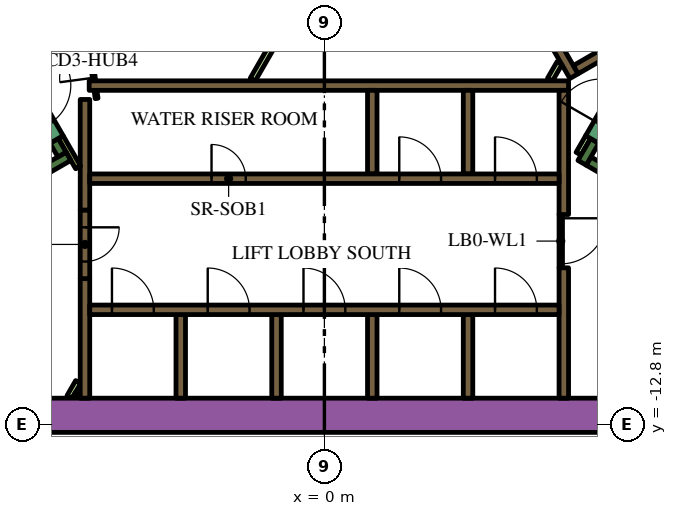
"""IFC4 building model, lengths in metres.
Left out: names, types, materials, properties, quantities, classifications, styles, units other than length and angle.
Written with IfcOpenShell. Run it as: python <this file> out.ifc"""

import sys

from ifc_helpers import new_model, si_unit, direction, frame, frame_2d, origin, place, context, subcontext, project, spatial, polyline, rectangle, outline, extrude, element, fill, save


model = new_model("IFC4")
c1 = context("Model", 3, precision=1e-05, world=origin(), true_north=direction((0.0, 1.0)))
c2 = subcontext(c1, "Body", "Model", "MODEL_VIEW")
j1 = project(units=[si_unit("LENGTHUNIT", "METRE"), si_unit("PLANEANGLEUNIT", "RADIAN")], contexts=[c1])
p1 = place(None, origin())
s1 = spatial("IfcSite", under=j1, at=p1, CompositionType="ELEMENT")
p2 = place(p1, origin())
s2 = spatial("IfcBuilding", under=s1, at=p2, CompositionType="ELEMENT")
p3 = place(p2, frame((0.0, 0.0, 62.7)))
s3 = spatial("IfcBuildingStorey", under=s2, at=p3, CompositionType="ELEMENT", Elevation=62.7)
p4 = place(p3, frame((6.776, 13.364, 0.0), z_axis=(0.0, 0.0, 1.0), x_axis=(0.500004177138, -0.8660229921, 0.0)))
e1 = element("IfcWall", 1, at=p4, inside=s3, PredefinedType="SOLIDWALL", context=c2, shape_type="SweptSolid", body=[
    extrude(rectangle(XDim=20.204, YDim=0.9, at=frame_2d((10.102, 0.0))), origin(), (0.0, 0.0, 1.0), 3.9),
])
p5 = place(p3, frame((-12.019, -12.55, 0.0), z_axis=(0.0, 0.0, 1.0), x_axis=(1.0, 0.0, 0.0)))
e2 = element("IfcWall", 2, at=p5, inside=s3, PredefinedType="SOLIDWALL", context=c2, shape_type="SweptSolid", body=[
    extrude(rectangle(XDim=21.63, YDim=0.9, at=frame_2d((10.815, 0.0))), origin(), (0.0, 0.0, 1.0), 3.9),
])
p6 = place(p3, frame((12.84, -9.261, 0.0), z_axis=(0.0, 0.0, 1.0), x_axis=(-0.866013990052, 0.500019768644, 0.0)))
e3 = element("IfcWall", 3, at=p6, inside=s3, PredefinedType="SOLIDWALL", context=c2, shape_type="SweptSolid", body=[
    extrude(rectangle(XDim=6.8, YDim=0.25, at=frame_2d((3.4, 0.0))), origin(), (0.0, 0.0, 1.0), 3.9),
])
p7 = place(p3, frame((7.113, -5.33, 0.0), z_axis=(0.0, 0.0, 1.0), x_axis=(-0.499965889992, -0.866045096311, 0.0)))
e4 = element("IfcWall", 4, at=p7, inside=s3, PredefinedType="SOLIDWALL", context=c2, shape_type="SweptSolid", body=[
    extrude(rectangle(XDim=0.666, YDim=0.25, at=frame_2d((0.333, 0.0))), origin(), (0.0, 0.0, 1.0), 3.9),
])
p8 = place(p3, frame((-12.84, -9.261, 0.0), z_axis=(0.0, 0.0, 1.0), x_axis=(0.866016039709, 0.500016218704, 0.0)))
e5 = element("IfcWall", 5, at=p8, inside=s3, PredefinedType="SOLIDWALL", context=c2, shape_type="SweptSolid", body=[
    extrude(rectangle(XDim=7.05, YDim=0.25, at=frame_2d((3.525, 0.0))), origin(), (0.0, 0.0, 1.0), 3.9),
])
p9 = place(p3, frame((-6.905, -5.69, 0.0), z_axis=(0.0, 0.0, 1.0), x_axis=(-0.499993700073, 0.866029041019, 0.0)))
e6 = element("IfcWall", 6, at=p9, inside=s3, PredefinedType="SOLIDWALL", context=c2, shape_type="SweptSolid", body=[
    extrude(rectangle(XDim=0.416, YDim=0.25, at=frame_2d((0.208, 0.0))), origin(), (0.0, 0.0, 1.0), 3.9),
])
p10 = place(p3, frame((-3.78, -12.1, 0.0), z_axis=(0.0, 0.0, 1.0), x_axis=(0.0, 1.0, 0.0)))
e7 = element("IfcWall", 7, at=p10, inside=s3, PredefinedType="SOLIDWALL", context=c2, shape_type="SweptSolid", body=[
    extrude(rectangle(XDim=2.2, YDim=0.25, at=frame_2d((1.1, 0.0))), origin(), (0.0, 0.0, 1.0), 3.9),
])
p11 = place(p3, frame((-6.3, -12.1, 0.0), z_axis=(0.0, 0.0, 1.0), x_axis=(0.0, 1.0, 0.0)))
e8 = element("IfcWall", 8, at=p11, inside=s3, PredefinedType="SOLIDWALL", context=c2, shape_type="SweptSolid", body=[
    extrude(rectangle(XDim=3.146, YDim=0.25, at=frame_2d((1.573, 0.0))), origin(), (0.0, 0.0, 1.0), 3.9),
])
p12 = place(p3, frame((-6.3, -4.24, 0.0), z_axis=(0.0, 0.0, 1.0), x_axis=(0.0, -1.0, 0.0)))
e9 = element("IfcWall", 9, at=p12, inside=s3, PredefinedType="SOLIDWALL", context=c2, shape_type="SweptSolid", body=[
    extrude(rectangle(XDim=2.914, YDim=0.25, at=frame_2d((1.457, 0.0))), origin(), (0.0, 0.0, 1.0), 3.9),
])
p13 = place(p3, frame((-6.19, -3.875, 0.0), z_axis=(0.0, 0.0, 1.0), x_axis=(1.0, 0.0, 0.0)))
e10 = element("IfcWall", 10, at=p13, inside=s3, PredefinedType="SOLIDWALL", context=c2, shape_type="SweptSolid", body=[
    extrude(rectangle(XDim=12.615, YDim=0.25, at=frame_2d((6.307, 0.0))), origin(), (0.0, 0.0, 1.0), 3.9),
])
p14 = place(p3, frame((6.3, -8.67, 0.0), z_axis=(0.0, 0.0, 1.0), x_axis=(0.0, -1.0, 0.0)))
e11 = element("IfcWall", 11, at=p14, inside=s3, PredefinedType="SOLIDWALL", context=c2, shape_type="SweptSolid", body=[
    extrude(rectangle(XDim=3.43, YDim=0.25, at=frame_2d((1.715, 0.0))), origin(), (0.0, 0.0, 1.0), 3.9),
])
p15 = place(p3, frame((6.3, -7.268, 0.0), z_axis=(0.0, 0.0, 1.0), x_axis=(0.0, 1.0, 0.0)))
e12 = element("IfcWall", 12, at=p15, inside=s3, PredefinedType="SOLIDWALL", context=c2, shape_type="SweptSolid", body=[
    extrude(rectangle(XDim=3.268, YDim=0.25, at=frame_2d((1.634, 0.0))), origin(), (0.0, 0.0, 1.0), 3.9),
])
for number, where, z_axis, x_axis in (
    (13, (3.78, -4.0, 0.0), (0.0, 0.0, 1.0), (0.0, -1.0, 0.0)),
    (14, (1.26, -4.0, 0.0), (0.0, 0.0, 1.0), (0.0, -1.0, 0.0)),
    (15, (3.78, -12.1, 0.0), (0.0, 0.0, 1.0), (0.0, 1.0, 0.0)),
    (16, (1.26, -12.1, 0.0), (0.0, 0.0, 1.0), (0.0, 1.0, 0.0)),
    (17, (-1.26, -12.1, 0.0), (0.0, 0.0, 1.0), (0.0, 1.0, 0.0)),
):
    element("IfcWall", number, at=place(p3, frame(where, z_axis=z_axis, x_axis=x_axis)), inside=s3, PredefinedType="SOLIDWALL", context=c2, shape_type="SweptSolid", body=[
        extrude(rectangle(XDim=2.2, YDim=0.25, at=frame_2d((1.1, 0.0))), origin(), (0.0, 0.0, 1.0), 3.9),
    ])
p16 = place(p3, origin())
e18 = element("IfcWall", 18, at=p16, inside=s3, PredefinedType="SOLIDWALL", context=c2, shape_type="SweptSolid", body=[
    extrude(outline(polyline([(0.335, 6.925), (0.335, 6.925), (0.335, 7.075), (0.335, 7.075), (0.335, 7.075), (0.245, 7.075), (0.079, 7.363), (0.035, 7.439), (0.252, 7.564), (0.377, 7.348), (6.552, -3.348), (6.677, -3.564), (6.46, -3.689), (4.897, -0.981), (0.332, 6.925), (0.335, 6.925), (0.335, 6.925)])), origin(), (0.0, 0.0, 1.0), 3.9),
])
p17 = place(p3, frame((9.352, -1.875, 0.0), z_axis=(0.0, 0.0, 1.0), x_axis=(-0.866024844342, -0.500000968981, 0.0)))
e19 = element("IfcWall", 19, at=p17, inside=s3, PredefinedType="SOLIDWALL", context=c2, shape_type="SweptSolid", body=[
    extrude(rectangle(XDim=3.162, YDim=0.25, at=frame_2d((1.581, 0.0))), origin(), (0.0, 0.0, 1.0), 3.9),
])
p18 = place(p3, frame((-6.708, -12.068, 0.0), z_axis=(0.0, 0.0, 1.0), x_axis=(0.500000789788, 0.8660249478, 0.0)))
e20 = element("IfcWall", 20, at=p18, inside=s3, PredefinedType="PARTITIONING", context=c2, shape_type="SweptSolid", body=[
    extrude(rectangle(XDim=0.456, YDim=0.15, at=frame_2d((0.228, 0.0))), origin(), (0.0, 0.0, 1.0), 2.75),
])
p19 = place(p3, frame((-6.534, -12.068, 0.0), z_axis=(0.0, 0.0, 1.0), x_axis=(0.500240224089, 0.865886665912, 0.0)))
e21 = element("IfcWall", 21, at=p19, inside=s3, PredefinedType="PARTITIONING", context=c2, shape_type="SweptSolid", body=[
    extrude(rectangle(XDim=0.109, YDim=0.15, at=frame_2d((0.054, 0.0))), origin(), (0.0, 0.0, 1.0), 2.75),
])
p20 = place(p3, frame((-6.48, -6.027, 0.0), z_axis=(0.0, 0.0, 1.0), x_axis=(-0.499936960004, 0.866061796884, 0.0)))
e22 = element("IfcWall", 22, at=p20, inside=s3, PredefinedType="PARTITIONING", context=c2, shape_type="SweptSolid", body=[
    extrude(rectangle(XDim=0.919, YDim=0.15, at=frame_2d((0.46, 0.0))), origin(), (0.0, 0.0, 1.0), 3.9),
])
p21 = place(p3, frame((-1.887, -3.718, 0.0), z_axis=(0.0, 0.0, 1.0), x_axis=(0.499842898591, 0.866116087328, 0.0)))
e23 = element("IfcWall", 23, at=p21, inside=s3, PredefinedType="PARTITIONING", context=c2, shape_type="SweptSolid", body=[
    extrude(rectangle(XDim=0.936, YDim=0.15, at=frame_2d((0.468, 0.0))), origin(), (0.0, 0.0, 1.0), 2.75),
])
p22 = place(p3, frame((6.688, -5.667, 0.0), z_axis=(0.0, 0.0, 1.0), x_axis=(0.499834152157, 0.86612113491, 0.0)))
e24 = element("IfcWall", 24, at=p22, inside=s3, PredefinedType="PARTITIONING", context=c2, shape_type="SweptSolid", body=[
    extrude(rectangle(XDim=0.505, YDim=0.15, at=frame_2d((0.252, 0.0))), origin(), (0.0, 0.0, 1.0), 2.75),
])
p23 = place(p3, frame((5.936, -3.718, 0.0), z_axis=(0.0, 0.0, 1.0), x_axis=(0.499890179513, 0.866088799389, 0.0)))
e25 = element("IfcWall", 25, at=p23, inside=s3, PredefinedType="PARTITIONING", context=c2, shape_type="SweptSolid", body=[
    extrude(rectangle(XDim=0.504, YDim=0.15, at=frame_2d((0.252, 0.0))), origin(), (0.0, 0.0, 1.0), 2.75),
])
p24 = place(p3, frame((-6.175, -9.775, 0.0), z_axis=(0.0, 0.0, 1.0), x_axis=(1.0, 0.0, 0.0)))
e26 = element("IfcWall", 26, at=p24, inside=s3, PredefinedType="SOLIDWALL", context=c2, shape_type="SweptSolid", body=[
    extrude(rectangle(XDim=12.35, YDim=0.25, at=frame_2d((6.175, 0.0))), origin(), (0.0, 0.0, 1.0), 3.9),
])
p25 = place(p24, frame((0.585, 0.0, 0.0)))
e27 = element("IfcOpeningElement", 27, at=p25, cuts=e26, PredefinedType="OPENING", context=c2, shape_type="SweptSolid", body=[
    extrude(rectangle(XDim=1.1, YDim=2.1, at=frame_2d((0.55, 1.05))), frame((0.0, 0.135, 0.0), z_axis=(0.0, -1.0, 0.0), x_axis=(1.0, 0.0, 0.0)), (0.0, 0.0, 1.0), 0.27),
])
p26 = place(p24, frame((3.105, 0.0, 0.0)))
e28 = element("IfcOpeningElement", 28, at=p26, cuts=e26, PredefinedType="OPENING", context=c2, shape_type="SweptSolid", body=[
    extrude(rectangle(XDim=1.1, YDim=2.1, at=frame_2d((0.55, 1.05))), frame((0.0, 0.135, 0.0), z_axis=(0.0, -1.0, 0.0), x_axis=(1.0, 0.0, 0.0)), (0.0, 0.0, 1.0), 0.27),
])
p27 = place(p24, frame((5.625, 0.0, 0.0)))
e29 = element("IfcOpeningElement", 29, at=p27, cuts=e26, PredefinedType="OPENING", context=c2, shape_type="SweptSolid", body=[
    extrude(rectangle(XDim=1.1, YDim=2.1, at=frame_2d((0.55, 1.05))), frame((0.0, 0.135, 0.0), z_axis=(0.0, -1.0, 0.0), x_axis=(1.0, 0.0, 0.0)), (0.0, 0.0, 1.0), 0.27),
])
p28 = place(p24, frame((8.145, 0.0, 0.0)))
e30 = element("IfcOpeningElement", 30, at=p28, cuts=e26, PredefinedType="OPENING", context=c2, shape_type="SweptSolid", body=[
    extrude(rectangle(XDim=1.1, YDim=2.1, at=frame_2d((0.55, 1.05))), frame((0.0, 0.135, 0.0), z_axis=(0.0, -1.0, 0.0), x_axis=(1.0, 0.0, 0.0)), (0.0, 0.0, 1.0), 0.27),
])
p29 = place(p24, frame((10.665, 0.0, 0.0)))
e31 = element("IfcOpeningElement", 31, at=p29, cuts=e26, PredefinedType="OPENING", context=c2, shape_type="SweptSolid", body=[
    extrude(rectangle(XDim=1.1, YDim=2.1, at=frame_2d((0.55, 1.05))), frame((0.0, 0.135, 0.0), z_axis=(0.0, -1.0, 0.0), x_axis=(1.0, 0.0, 0.0)), (0.0, 0.0, 1.0), 0.27),
])
p30 = place(p3, frame((-6.175, -6.325, 0.0), z_axis=(0.0, 0.0, 1.0), x_axis=(1.0, 0.0, 0.0)))
e32 = element("IfcWall", 32, at=p30, inside=s3, PredefinedType="SOLIDWALL", context=c2, shape_type="SweptSolid", body=[
    extrude(rectangle(XDim=12.35, YDim=0.25, at=frame_2d((6.175, 0.0))), origin(), (0.0, 0.0, 1.0), 3.9),
])
p31 = place(p30, frame((3.205, 0.0, 0.0)))
e33 = element("IfcOpeningElement", 33, at=p31, cuts=e32, PredefinedType="OPENING", context=c2, shape_type="SweptSolid", body=[
    extrude(rectangle(XDim=0.9, YDim=2.1, at=frame_2d((0.45, 1.05))), frame((0.0, 0.135, 0.0), z_axis=(0.0, -1.0, 0.0), x_axis=(1.0, 0.0, 0.0)), (0.0, 0.0, 1.0), 0.27),
])
p32 = place(p30, frame((8.145, 0.0, 0.0)))
e34 = element("IfcOpeningElement", 34, at=p32, cuts=e32, PredefinedType="OPENING", context=c2, shape_type="SweptSolid", body=[
    extrude(rectangle(XDim=1.1, YDim=2.1, at=frame_2d((0.55, 1.05))), frame((0.0, 0.135, 0.0), z_axis=(0.0, -1.0, 0.0), x_axis=(1.0, 0.0, 0.0)), (0.0, 0.0, 1.0), 0.27),
])
p33 = place(p30, frame((10.665, 0.0, 0.0)))
e35 = element("IfcOpeningElement", 35, at=p33, cuts=e32, PredefinedType="OPENING", context=c2, shape_type="SweptSolid", body=[
    extrude(rectangle(XDim=1.1, YDim=2.1, at=frame_2d((0.55, 1.05))), frame((0.0, 0.135, 0.0), z_axis=(0.0, -1.0, 0.0), x_axis=(1.0, 0.0, 0.0)), (0.0, 0.0, 1.0), 0.27),
])
p34 = place(p3, frame((7.048, -5.292, 0.0), z_axis=(0.0, 0.0, 1.0), x_axis=(0.49994051562, 0.866059744384, 0.0)))
e36 = element("IfcWall", 36, at=p34, inside=s3, PredefinedType="SOLIDWALL", context=c2, shape_type="SweptSolid", body=[
    extrude(rectangle(XDim=2.1, YDim=0.4, at=frame_2d((1.05, 0.0))), origin(), (0.0, 0.0, 1.0), 3.9),
])
p35 = place(p34, frame((0.45, 0.0, 0.0)))
e37 = element("IfcOpeningElement", 37, at=p35, cuts=e36, PredefinedType="OPENING", context=c2, shape_type="SweptSolid", body=[
    extrude(rectangle(XDim=1.2, YDim=2.1, at=frame_2d((0.6, 1.05))), frame((0.0, 0.21, 0.0), z_axis=(0.0, -1.0, 0.0), x_axis=(1.0, 0.0, 0.0)), (0.0, 0.0, 1.0), 0.42),
])
p36 = place(p3, frame((-8.098, -3.474, 0.0), z_axis=(0.0, 0.0, 1.0), x_axis=(0.49994051562, -0.866059744384, 0.0)))
e38 = element("IfcWall", 38, at=p36, inside=s3, PredefinedType="SOLIDWALL", context=c2, shape_type="SweptSolid", body=[
    extrude(rectangle(XDim=2.1, YDim=0.4, at=frame_2d((1.05, 0.0))), origin(), (0.0, 0.0, 1.0), 3.9),
])
p37 = place(p36, frame((0.45, 0.0, 0.0)))
e39 = element("IfcOpeningElement", 39, at=p37, cuts=e38, PredefinedType="OPENING", context=c2, shape_type="SweptSolid", body=[
    extrude(rectangle(XDim=1.2, YDim=2.1, at=frame_2d((0.6, 1.05))), frame((0.0, 0.21, 0.0), z_axis=(0.0, -1.0, 0.0), x_axis=(1.0, 0.0, 0.0)), (0.0, 0.0, 1.0), 0.42),
])
p38 = place(p3, frame((-6.3, -7.154, 0.0), z_axis=(0.0, 0.0, 1.0), x_axis=(0.0, -1.0, 0.0)))
e40 = element("IfcWall", 40, at=p38, inside=s3, PredefinedType="SOLIDWALL", context=c2, shape_type="SweptSolid", body=[
    extrude(rectangle(XDim=1.8, YDim=0.25, at=frame_2d((0.9, 0.0))), origin(), (0.0, 0.0, 1.0), 3.9),
])
p39 = place(p38, frame((0.45, 0.0, 0.0)))
e41 = element("IfcOpeningElement", 41, at=p39, cuts=e40, PredefinedType="OPENING", context=c2, shape_type="SweptSolid", body=[
    extrude(rectangle(XDim=0.9, YDim=2.1, at=frame_2d((0.45, 1.05))), frame((0.0, 0.135, 0.0), z_axis=(0.0, -1.0, 0.0), x_axis=(1.0, 0.0, 0.0)), (0.0, 0.0, 1.0), 0.27),
])
p40 = place(p3, frame((-5.995, -4.213, 0.0), z_axis=(0.0, 0.0, 1.0), x_axis=(-0.132072335448, 0.991240081014, 0.0)))
e42 = element("IfcWall", 42, at=p40, inside=s3, PredefinedType="PARTITIONING", context=c2, shape_type="SweptSolid", body=[
    extrude(rectangle(XDim=2.1, YDim=0.076, at=frame_2d((1.05, 0.0))), origin(), (0.0, 0.0, 1.0), 2.75),
])
p41 = place(p40, frame((0.55, 0.0, 0.0)))
e43 = element("IfcOpeningElement", 43, at=p41, cuts=e42, PredefinedType="OPENING", context=c2, shape_type="SweptSolid", body=[
    extrude(rectangle(XDim=0.9, YDim=2.1, at=frame_2d((0.45, 1.05))), frame((0.0, 0.048, 0.0), z_axis=(0.0, -1.0, 0.0), x_axis=(1.0, 0.0, 0.0)), (0.0, 0.0, 1.0), 0.096),
])
p42 = place(p3, frame((6.22, -7.266, 0.0), z_axis=(0.0, 0.0, 1.0), x_axis=(0.0, -1.0, 0.0)))
e44 = element("IfcWall", 44, at=p42, inside=s3, PredefinedType="PARTITIONING", context=c2, shape_type="SweptSolid", body=[
    extrude(rectangle(XDim=1.4, YDim=0.09, at=frame_2d((0.7, 0.0))), origin(), (0.0, 0.0, 1.0), 2.75),
])
p43 = place(p42, frame((0.1, 0.0, 0.0)))
e45 = element("IfcOpeningElement", 45, at=p43, cuts=e44, PredefinedType="OPENING", context=c2, shape_type="SweptSolid", body=[
    extrude(rectangle(XDim=1.2, YDim=2.1, at=frame_2d((0.6, 1.05))), frame((0.0, 0.055, 0.0), z_axis=(0.0, -1.0, 0.0), x_axis=(1.0, 0.0, 0.0)), (0.0, 0.0, 1.0), 0.11),
])
p44 = place(p3, frame((6.163, 18.475, 0.0), z_axis=(0.0, 0.0, 1.0), x_axis=(0.500001317485, -0.866024643133, 0.0)))
e46 = element("IfcWall", 46, at=p44, inside=s3, PredefinedType="PARTITIONING", context=c2, shape_type="SweptSolid", body=[
    extrude(rectangle(XDim=25.767, YDim=0.15, at=frame_2d((12.883, 0.0))), origin(), (0.0, 0.0, 1.0), 2.75),
])
p45 = place(p44, frame((21.138, 0.0, 0.0)))
e47 = element("IfcOpeningElement", 47, at=p45, cuts=e46, PredefinedType="OPENING", context=c2, shape_type="SweptSolid", body=[
    extrude(rectangle(XDim=1.0, YDim=2.1, at=frame_2d((0.5, 1.05))), frame((0.0, 0.085, 0.0), z_axis=(0.0, -1.0, 0.0), x_axis=(1.0, 0.0, 0.0)), (0.0, 0.0, 1.0), 0.17),
])
p46 = place(p44, frame((9.948, 0.0, 0.0)))
e48 = element("IfcOpeningElement", 48, at=p46, cuts=e46, PredefinedType="OPENING", context=c2, shape_type="SweptSolid", body=[
    extrude(rectangle(XDim=1.1, YDim=2.1, at=frame_2d((0.55, 1.05))), frame((0.0, 0.085, 0.0), z_axis=(0.0, -1.0, 0.0), x_axis=(1.0, 0.0, 0.0)), (0.0, 0.0, 1.0), 0.17),
])
p47 = place(p44, frame((8.641, 0.0, 0.0)))
e49 = element("IfcOpeningElement", 49, at=p47, cuts=e46, PredefinedType="OPENING", context=c2, shape_type="SweptSolid", body=[
    extrude(rectangle(XDim=1.0, YDim=2.1, at=frame_2d((0.5, 1.05))), frame((0.0, 0.085, 0.0), z_axis=(0.0, -1.0, 0.0), x_axis=(1.0, 0.0, 0.0)), (0.0, 0.0, 1.0), 0.17),
])
p48 = place(p44, frame((0.18, 0.0, 0.0)))
e50 = element("IfcOpeningElement", 50, at=p48, cuts=e46, PredefinedType="OPENING", context=c2, shape_type="SweptSolid", body=[
    extrude(rectangle(XDim=1.0, YDim=2.1, at=frame_2d((0.5, 1.05))), frame((0.0, 0.085, 0.0), z_axis=(0.0, -1.0, 0.0), x_axis=(1.0, 0.0, 0.0)), (0.0, 0.0, 1.0), 0.17),
])
p49 = place(p3, frame((-19.081, -3.9, 0.0), z_axis=(0.0, 0.0, 1.0), x_axis=(0.499998313975, 0.866026377209, 0.0)))
e51 = element("IfcWall", 51, at=p49, inside=s3, PredefinedType="PARTITIONING", context=c2, shape_type="SweptSolid", body=[
    extrude(rectangle(XDim=25.766, YDim=0.15, at=frame_2d((12.883, 0.0))), origin(), (0.0, 0.0, 1.0), 2.75),
])
p50 = place(p49, frame((24.586, 0.0, 0.0)))
e52 = element("IfcOpeningElement", 52, at=p50, cuts=e51, PredefinedType="OPENING", context=c2, shape_type="SweptSolid", body=[
    extrude(rectangle(XDim=1.0, YDim=2.1, at=frame_2d((0.5, 1.05))), frame((0.0, 0.085, 0.0), z_axis=(0.0, -1.0, 0.0), x_axis=(1.0, 0.0, 0.0)), (0.0, 0.0, 1.0), 0.17),
])
p51 = place(p49, frame((9.948, 0.0, 0.0)))
e53 = element("IfcOpeningElement", 53, at=p51, cuts=e51, PredefinedType="OPENING", context=c2, shape_type="SweptSolid", body=[
    extrude(rectangle(XDim=1.0, YDim=2.1, at=frame_2d((0.5, 1.05))), frame((0.0, 0.085, 0.0), z_axis=(0.0, -1.0, 0.0), x_axis=(1.0, 0.0, 0.0)), (0.0, 0.0, 1.0), 0.17),
])
p52 = place(p49, frame((7.782, 0.0, 0.0)))
e54 = element("IfcOpeningElement", 54, at=p52, cuts=e51, PredefinedType="OPENING", context=c2, shape_type="SweptSolid", body=[
    extrude(rectangle(XDim=0.9, YDim=2.1, at=frame_2d((0.45, 1.05))), frame((0.0, 0.085, 0.0), z_axis=(0.0, -1.0, 0.0), x_axis=(1.0, 0.0, 0.0)), (0.0, 0.0, 1.0), 0.17),
])
p53 = place(p49, frame((4.658, 0.0, 0.0)))
e55 = element("IfcOpeningElement", 55, at=p53, cuts=e51, PredefinedType="OPENING", context=c2, shape_type="SweptSolid", body=[
    extrude(rectangle(XDim=0.9, YDim=2.1, at=frame_2d((0.45, 1.05))), frame((0.0, 0.085, 0.0), z_axis=(0.0, -1.0, 0.0), x_axis=(1.0, 0.0, 0.0)), (0.0, 0.0, 1.0), 0.17),
])
p54 = place(p25, origin())
e56 = element("IfcDoor", 56, at=p54, inside=s3, OperationType="DOUBLE_DOOR_SLIDING", PredefinedType="DOOR", context=c2, shape_type="SweptSolid", body=[
    extrude(rectangle(XDim=1.1, YDim=2.1, at=frame_2d((0.55, 1.05))), frame((0.0, 0.025, 0.0), z_axis=(0.0, -1.0, 0.0), x_axis=(1.0, 0.0, 0.0)), (0.0, 0.0, 1.0), 0.05),
])
fill(e27, e56)
p55 = place(p26, origin())
e57 = element("IfcDoor", 57, at=p55, inside=s3, OperationType="DOUBLE_DOOR_SLIDING", PredefinedType="DOOR", context=c2, shape_type="SweptSolid", body=[
    extrude(rectangle(XDim=1.1, YDim=2.1, at=frame_2d((0.55, 1.05))), frame((0.0, 0.025, 0.0), z_axis=(0.0, -1.0, 0.0), x_axis=(1.0, 0.0, 0.0)), (0.0, 0.0, 1.0), 0.05),
])
fill(e28, e57)
p56 = place(p27, origin())
e58 = element("IfcDoor", 58, at=p56, inside=s3, OperationType="DOUBLE_DOOR_SLIDING", PredefinedType="DOOR", context=c2, shape_type="SweptSolid", body=[
    extrude(rectangle(XDim=1.1, YDim=2.1, at=frame_2d((0.55, 1.05))), frame((0.0, 0.025, 0.0), z_axis=(0.0, -1.0, 0.0), x_axis=(1.0, 0.0, 0.0)), (0.0, 0.0, 1.0), 0.05),
])
fill(e29, e58)
p57 = place(p28, origin())
e59 = element("IfcDoor", 59, at=p57, inside=s3, OperationType="DOUBLE_DOOR_SLIDING", PredefinedType="DOOR", context=c2, shape_type="SweptSolid", body=[
    extrude(rectangle(XDim=1.1, YDim=2.1, at=frame_2d((0.55, 1.05))), frame((0.0, 0.025, 0.0), z_axis=(0.0, -1.0, 0.0), x_axis=(1.0, 0.0, 0.0)), (0.0, 0.0, 1.0), 0.05),
])
fill(e30, e59)
p58 = place(p29, origin())
e60 = element("IfcDoor", 60, at=p58, inside=s3, OperationType="DOUBLE_DOOR_SLIDING", PredefinedType="DOOR", context=c2, shape_type="SweptSolid", body=[
    extrude(rectangle(XDim=1.1, YDim=2.1, at=frame_2d((0.55, 1.05))), frame((0.0, 0.025, 0.0), z_axis=(0.0, -1.0, 0.0), x_axis=(1.0, 0.0, 0.0)), (0.0, 0.0, 1.0), 0.05),
])
fill(e31, e60)
p59 = place(p31, origin())
e61 = element("IfcDoor", 61, at=p59, inside=s3, OperationType="SINGLE_SWING_LEFT", PredefinedType="DOOR", context=c2, shape_type="SweptSolid", body=[
    extrude(rectangle(XDim=0.9, YDim=2.1, at=frame_2d((0.45, 1.05))), frame((0.0, 0.025, 0.0), z_axis=(0.0, -1.0, 0.0), x_axis=(1.0, 0.0, 0.0)), (0.0, 0.0, 1.0), 0.05),
])
fill(e33, e61)
p60 = place(p32, origin())
e62 = element("IfcDoor", 62, at=p60, inside=s3, OperationType="DOUBLE_DOOR_SLIDING", PredefinedType="DOOR", context=c2, shape_type="SweptSolid", body=[
    extrude(rectangle(XDim=1.1, YDim=2.1, at=frame_2d((0.55, 1.05))), frame((0.0, 0.025, 0.0), z_axis=(0.0, -1.0, 0.0), x_axis=(1.0, 0.0, 0.0)), (0.0, 0.0, 1.0), 0.05),
])
fill(e34, e62)
p61 = place(p33, origin())
e63 = element("IfcDoor", 63, at=p61, inside=s3, OperationType="DOUBLE_DOOR_SLIDING", PredefinedType="DOOR", context=c2, shape_type="SweptSolid", body=[
    extrude(rectangle(XDim=1.1, YDim=2.1, at=frame_2d((0.55, 1.05))), frame((0.0, 0.025, 0.0), z_axis=(0.0, -1.0, 0.0), x_axis=(1.0, 0.0, 0.0)), (0.0, 0.0, 1.0), 0.05),
])
fill(e35, e63)
p62 = place(p39, origin())
e64 = element("IfcDoor", 64, at=p62, inside=s3, OperationType="SINGLE_SWING_LEFT", PredefinedType="DOOR", context=c2, shape_type="SweptSolid", body=[
    extrude(rectangle(XDim=0.9, YDim=2.1, at=frame_2d((0.45, 1.05))), frame((0.0, 0.025, 0.0), z_axis=(0.0, -1.0, 0.0), x_axis=(1.0, 0.0, 0.0)), (0.0, 0.0, 1.0), 0.05),
])
fill(e41, e64)
p63 = place(p41, origin())
e65 = element("IfcDoor", 65, at=p63, inside=s3, OperationType="SINGLE_SWING_LEFT", PredefinedType="DOOR", context=c2, shape_type="SweptSolid", body=[
    extrude(rectangle(XDim=0.9, YDim=2.1, at=frame_2d((0.45, 1.05))), frame((0.0, 0.025, 0.0), z_axis=(0.0, -1.0, 0.0), x_axis=(1.0, 0.0, 0.0)), (0.0, 0.0, 1.0), 0.05),
])
fill(e43, e65)
p64 = place(p43, origin())
e66 = element("IfcDoor", 66, at=p64, inside=s3, OperationType="SINGLE_SWING_LEFT", PredefinedType="DOOR", context=c2, shape_type="SweptSolid", body=[
    extrude(rectangle(XDim=1.2, YDim=2.1, at=frame_2d((0.6, 1.05))), frame((0.0, 0.025, 0.0), z_axis=(0.0, -1.0, 0.0), x_axis=(1.0, 0.0, 0.0)), (0.0, 0.0, 1.0), 0.05),
])
fill(e45, e66)
save(model, sys.argv[1])
